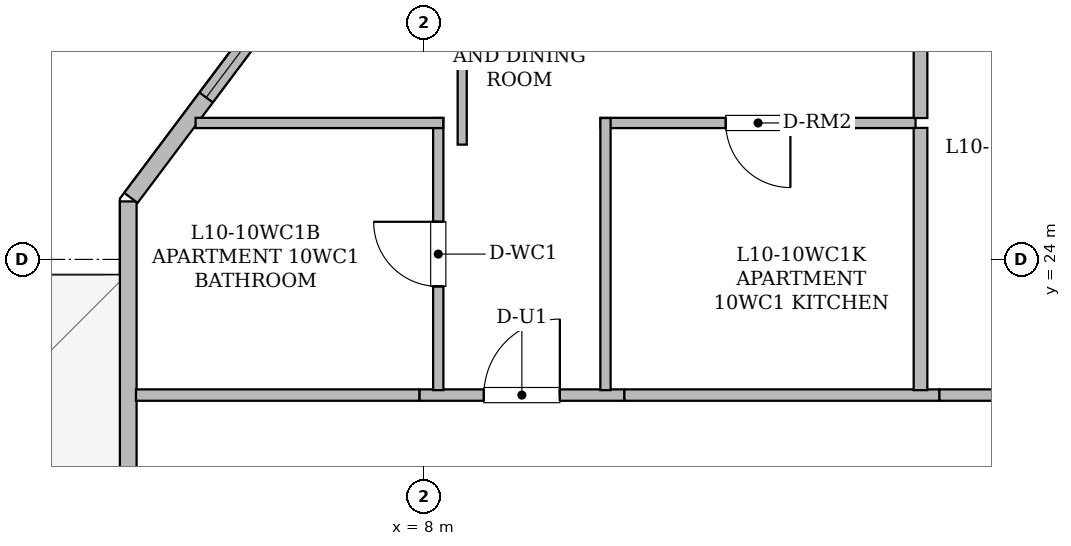
"""IFC4 building model, lengths in metres.
Left out: names, types, materials, properties, quantities, classifications, styles, units other than length and angle.
Written with IfcOpenShell. Run it as: python <this file> out.ifc"""

import sys

from ifc_helpers import new_model, si_unit, direction, frame, frame_2d, origin, place, context, subcontext, project, spatial, rectangle, extrude, element, fill, save


model = new_model("IFC4")
c1 = context("Model", 3, precision=1e-05, world=origin(), true_north=direction((0.0, 1.0)))
c2 = subcontext(c1, "Body", "Model", "MODEL_VIEW")
j1 = project(units=[si_unit("LENGTHUNIT", "METRE"), si_unit("PLANEANGLEUNIT", "RADIAN")], contexts=[c1])
p1 = place(None, origin())
s1 = spatial("IfcSite", under=j1, at=p1, CompositionType="ELEMENT")
p2 = place(p1, origin())
s2 = spatial("IfcBuilding", under=s1, at=p2, CompositionType="ELEMENT")
p3 = place(p2, frame((0.0, 0.0, 44.25)))
s3 = spatial("IfcBuildingStorey", under=s2, at=p3, CompositionType="ELEMENT", Elevation=44.25)
p4 = place(p3, frame((4.11, 7.317, 0.0), z_axis=(0.0, 0.0, 1.0), x_axis=(0.0, 1.0, 0.0)))
e1 = element("IfcWall", 1, at=p4, inside=s3, PredefinedType="STANDARD", context=c2, shape_type="SweptSolid", body=[
    extrude(rectangle(XDim=17.446, YDim=0.22, at=frame_2d((8.723, 0.0))), origin(), (0.0, 0.0, 1.0), 3.43),
])
p5 = place(p4, frame((4.989, 0.0, 0.0)))
e2 = element("IfcOpeningElement", 2, at=p5, cuts=e1, PredefinedType="OPENING", context=c2, shape_type="SweptSolid", body=[
    extrude(rectangle(XDim=1.1, YDim=2.2, at=frame_2d((0.55, 1.1))), frame((0.0, 0.12, 0.0), z_axis=(0.0, -1.0, 0.0), x_axis=(1.0, 0.0, 0.0)), (0.0, 0.0, 1.0), 0.24),
])
p6 = place(p4, frame((8.081, 0.0, 0.8)))
e3 = element("IfcOpeningElement", 3, at=p6, cuts=e1, PredefinedType="OPENING", context=c2, shape_type="SweptSolid", body=[
    extrude(rectangle(XDim=1.2, YDim=1.5, at=frame_2d((0.6, 0.75))), frame((0.0, 0.12, 0.0), z_axis=(0.0, -1.0, 0.0), x_axis=(1.0, 0.0, 0.0)), (0.0, 0.0, 1.0), 0.24),
])
p7 = place(p3, frame((4.145, 24.809, 0.0), z_axis=(0.0, 0.0, 1.0), x_axis=(0.599823674734, 0.800132213592, 0.0)))
e4 = element("IfcWall", 4, at=p7, inside=s3, PredefinedType="STANDARD", context=c2, shape_type="SweptSolid", body=[
    extrude(rectangle(XDim=3.988, YDim=0.22, at=frame_2d((1.994, 0.0))), origin(), (0.0, 0.0, 1.0), 3.43),
])
p8 = place(p7, frame((1.651, 0.0, 0.85)))
e5 = element("IfcOpeningElement", 5, at=p8, cuts=e4, PredefinedType="OPENING", context=c2, shape_type="SweptSolid", body=[
    extrude(rectangle(XDim=1.65, YDim=1.55, at=frame_2d((0.825, 0.775))), frame((0.0, 0.12, 0.0), z_axis=(0.0, -1.0, 0.0), x_axis=(1.0, 0.0, 0.0)), (0.0, 0.0, 1.0), 0.24),
])
p9 = place(p3, frame((7.94, 22.215, 0.0), z_axis=(0.0, 0.0, 1.0), x_axis=(1.0, 0.0, 0.0)))
e6 = element("IfcWall", 6, at=p9, inside=s3, PredefinedType="STANDARD", context=c2, shape_type="SweptSolid", body=[
    extrude(rectangle(XDim=2.698, YDim=0.15, at=frame_2d((1.349, 0.0))), origin(), (0.0, 0.0, 1.0), 3.43),
])
p10 = place(p9, frame((0.849, 0.0, 0.0)))
e7 = element("IfcOpeningElement", 7, at=p10, cuts=e6, PredefinedType="OPENING", context=c2, shape_type="SweptSolid", body=[
    extrude(rectangle(XDim=1.0, YDim=2.15, at=frame_2d((0.5, 1.075))), frame((0.0, 0.085, 0.0), z_axis=(0.0, -1.0, 0.0), x_axis=(1.0, 0.0, 0.0)), (0.0, 0.0, 1.0), 0.17),
])
p11 = place(p3, frame((4.212, 22.215, 0.0), z_axis=(0.0, 0.0, 1.0), x_axis=(1.0, 0.0, 0.0)))
e8 = element("IfcWall", 8, at=p11, inside=s3, PredefinedType="STANDARD", context=c2, shape_type="SweptSolid", body=[
    extrude(rectangle(XDim=3.728, YDim=0.15, at=frame_2d((1.864, 0.0))), origin(), (0.0, 0.0, 1.0), 2.803),
])
p12 = place(p3, frame((10.638, 22.215, 0.0), z_axis=(0.0, 0.0, 1.0), x_axis=(1.0, 0.0, 0.0)))
e9 = element("IfcWall", 9, at=p12, inside=s3, PredefinedType="STANDARD", context=c2, shape_type="SweptSolid", body=[
    extrude(rectangle(XDim=4.145, YDim=0.15, at=frame_2d((2.073, 0.0))), origin(), (0.0, 0.0, 1.0), 3.43),
])
p13 = place(p3, frame((14.783, 22.215, 0.0), z_axis=(0.0, 0.0, 1.0), x_axis=(1.0, 0.0, 0.0)))
e10 = element("IfcWall", 10, at=p13, inside=s3, PredefinedType="STANDARD", context=c2, shape_type="SweptSolid", body=[
    extrude(rectangle(XDim=6.712, YDim=0.15, at=frame_2d((3.356, 0.0))), origin(), (0.0, 0.0, 1.0), 2.647),
])
p14 = place(p3, frame((8.189, 22.28, 0.0), z_axis=(0.0, 0.0, 1.0), x_axis=(0.0, 1.0, 0.0)))
e11 = element("IfcWall", 11, at=p14, inside=s3, PredefinedType="PARTITIONING", context=c2, shape_type="SweptSolid", body=[
    extrude(rectangle(XDim=3.58, YDim=0.135, at=frame_2d((1.79, 0.0))), origin(), (0.0, 0.0, 1.0), 2.957),
])
p15 = place(p14, frame((1.365, 0.0, 0.0)))
e12 = element("IfcOpeningElement", 12, at=p15, cuts=e11, PredefinedType="OPENING", context=c2, shape_type="SweptSolid", body=[
    extrude(rectangle(XDim=0.85, YDim=2.1, at=frame_2d((0.425, 1.05))), frame((0.0, 0.077, 0.0), z_axis=(0.0, -1.0, 0.0), x_axis=(1.0, 0.0, 0.0)), (0.0, 0.0, 1.0), 0.155),
])
p16 = place(p3, frame((8.254, 25.795, 0.0), z_axis=(0.0, 0.0, 1.0), x_axis=(-1.0, 0.0, 0.0)))
e13 = element("IfcWall", 13, at=p16, inside=s3, PredefinedType="PARTITIONING", context=c2, shape_type="SweptSolid", body=[
    extrude(rectangle(XDim=3.258, YDim=0.135, at=frame_2d((1.629, 0.0))), origin(), (0.0, 0.0, 1.0), 2.803),
])
p17 = place(p3, frame((14.469, 25.795, 0.0), z_axis=(0.0, 0.0, 1.0), x_axis=(-1.0, 0.0, 0.0)))
e14 = element("IfcWall", 14, at=p17, inside=s3, PredefinedType="PARTITIONING", context=c2, shape_type="SweptSolid", body=[
    extrude(rectangle(XDim=4.145, YDim=0.135, at=frame_2d((2.073, 0.0))), origin(), (0.0, 0.0, 1.0), 3.43),
])
p18 = place(p17, frame((1.647, 0.0, 0.0)))
e15 = element("IfcOpeningElement", 15, at=p18, cuts=e14, PredefinedType="OPENING", context=c2, shape_type="SweptSolid", body=[
    extrude(rectangle(XDim=0.85, YDim=2.1, at=frame_2d((0.425, 1.05))), frame((0.0, 0.077, 0.0), z_axis=(0.0, -1.0, 0.0), x_axis=(1.0, 0.0, 0.0)), (0.0, 0.0, 1.0), 0.155),
])
p19 = place(p3, frame((10.389, 25.86, 0.0), z_axis=(0.0, 0.0, 1.0), x_axis=(0.0, -1.0, 0.0)))
e16 = element("IfcWall", 16, at=p19, inside=s3, PredefinedType="PARTITIONING", context=c2, shape_type="SweptSolid", body=[
    extrude(rectangle(XDim=3.58, YDim=0.135, at=frame_2d((1.79, 0.0))), origin(), (0.0, 0.0, 1.0), 2.957),
])
p20 = place(p3, frame((8.504, 25.51, 0.0), z_axis=(0.0, 0.0, 1.0), x_axis=(0.0, 1.0, 0.0)))
e17 = element("IfcWall", 17, at=p20, inside=s3, PredefinedType="PARTITIONING", context=c2, shape_type="SweptSolid", body=[
    extrude(rectangle(XDim=9.651, YDim=0.12, at=frame_2d((4.825, 0.0))), origin(), (0.0, 0.0, 1.0), 3.43),
])
p21 = place(p3, frame((14.534, 28.11, 0.0), z_axis=(0.0, 0.0, 1.0), x_axis=(0.0, -1.0, 0.0)))
e18 = element("IfcWall", 18, at=p21, inside=s3, PredefinedType="STANDARD", context=c2, shape_type="SweptSolid", body=[
    extrude(rectangle(XDim=2.25, YDim=0.18, at=frame_2d((1.125, 0.0))), origin(), (0.0, 0.0, 1.0), 3.43),
])
p22 = place(p3, frame((14.534, 25.73, 0.0), z_axis=(0.0, 0.0, 1.0), x_axis=(0.0, -1.0, 0.0)))
e19 = element("IfcWall", 19, at=p22, inside=s3, PredefinedType="STANDARD", context=c2, shape_type="SweptSolid", body=[
    extrude(rectangle(XDim=3.45, YDim=0.18, at=frame_2d((1.725, 0.0))), origin(), (0.0, 0.0, 1.0), 2.957),
])
p23 = place(p8, origin())
e20 = element("IfcWindow", 20, at=p23, inside=s3, PartitioningType="SINGLE_PANEL", PredefinedType="WINDOW", context=c2, shape_type="SweptSolid", body=[
    extrude(rectangle(XDim=1.65, YDim=1.55, at=frame_2d((0.825, 0.775))), frame((0.0, 0.03, 0.0), z_axis=(0.0, -1.0, 0.0), x_axis=(1.0, 0.0, 0.0)), (0.0, 0.0, 1.0), 0.06),
])
fill(e5, e20)
p24 = place(p10, origin())
e21 = element("IfcDoor", 21, at=p24, inside=s3, OperationType="SINGLE_SWING_RIGHT", PredefinedType="DOOR", context=c2, shape_type="SweptSolid", body=[
    extrude(rectangle(XDim=1.0, YDim=2.15, at=frame_2d((0.5, 1.075))), frame((0.0, 0.025, 0.0), z_axis=(0.0, -1.0, 0.0), x_axis=(1.0, 0.0, 0.0)), (0.0, 0.0, 1.0), 0.05),
])
fill(e7, e21)
p25 = place(p15, origin())
e22 = element("IfcDoor", 22, at=p25, inside=s3, OperationType="SINGLE_SWING_RIGHT", PredefinedType="DOOR", context=c2, shape_type="SweptSolid", body=[
    extrude(rectangle(XDim=0.85, YDim=2.1, at=frame_2d((0.425, 1.05))), frame((0.0, 0.025, 0.0), z_axis=(0.0, -1.0, 0.0), x_axis=(1.0, 0.0, 0.0)), (0.0, 0.0, 1.0), 0.05),
])
fill(e12, e22)
p26 = place(p18, origin())
e23 = element("IfcDoor", 23, at=p26, inside=s3, OperationType="SINGLE_SWING_LEFT", PredefinedType="DOOR", context=c2, shape_type="SweptSolid", body=[
    extrude(rectangle(XDim=0.85, YDim=2.1, at=frame_2d((0.425, 1.05))), frame((0.0, 0.025, 0.0), z_axis=(0.0, -1.0, 0.0), x_axis=(1.0, 0.0, 0.0)), (0.0, 0.0, 1.0), 0.05),
])
fill(e15, e23)
save(model, sys.argv[1])
